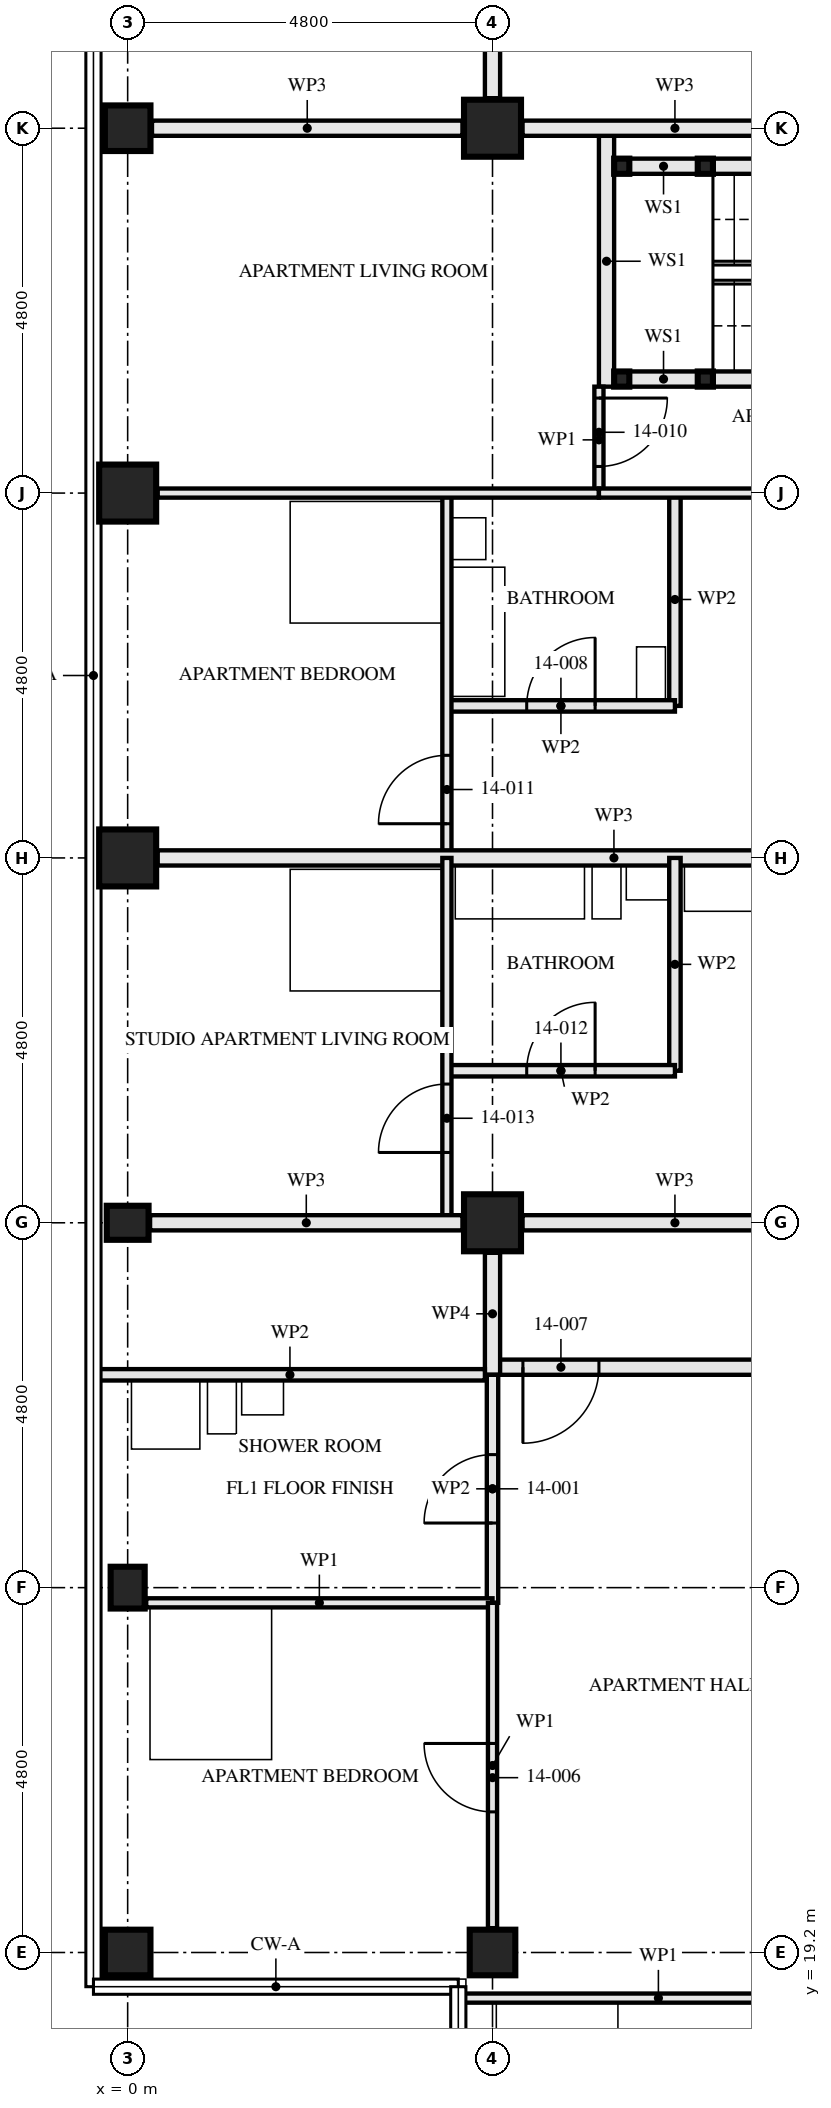
"""IFC4 building model, lengths in metres.
Left out: names, types, materials, properties, quantities, classifications, styles, units other than length and angle.
Written with IfcOpenShell. Run it as: python <this file> out.ifc"""

import sys

from ifc_helpers import new_model, si_unit, direction, frame, frame_2d, origin, origin_2d, place, context, subcontext, project, spatial, rectangle, hollow_rectangle, i_section, extrude, element, fill, save


model = new_model("IFC4")
c1 = context("Model", 3, precision=1e-05, world=origin(), true_north=direction((0.0, 1.0)))
c2 = subcontext(c1, "Body", "Model", "MODEL_VIEW")
j1 = project(units=[si_unit("LENGTHUNIT", "METRE"), si_unit("PLANEANGLEUNIT", "RADIAN")], contexts=[c1])
p1 = place(None, origin())
s1 = spatial("IfcSite", under=j1, at=p1, CompositionType="ELEMENT")
p2 = place(p1, origin())
s2 = spatial("IfcBuilding", under=s1, at=p2, CompositionType="ELEMENT")
p3 = place(p2, frame((0.0, 0.0, 55.0)))
s3 = spatial("IfcBuildingStorey", under=s2, at=p3, CompositionType="ELEMENT", Elevation=55.0)
p4 = place(p3, frame((0.0, 19.2, 0.0), z_axis=(0.0, 0.0, 1.0), x_axis=(0.0, 1.0, 0.0)))
e1 = element("IfcColumn", 1, at=p4, inside=s3, PredefinedType="COLUMN", context=c2, shape_type="SweptSolid", body=[
    extrude(hollow_rectangle(XDim=0.6, YDim=0.6, WallThickness=0.05, at=origin_2d()), origin(), (0.0, 0.0, 1.0), 3.5),
])
for number, where, z_axis, x_axis in (
    (2, (0.0, 24.0, 0.0), (0.0, 0.0, 1.0), (1.0, 0.0, 0.0)),
    (3, (0.0, 28.8, 0.0), (0.0, 0.0, 1.0), (0.0, 1.0, 0.0)),
):
    element("IfcColumn", number, at=place(p3, frame(where, z_axis=z_axis, x_axis=x_axis)), inside=s3, PredefinedType="COLUMN", context=c2, shape_type="SweptSolid", body=[
        extrude(i_section(OverallWidth=0.448, OverallDepth=0.55, WebThickness=0.072, FlangeThickness=0.115, FilletRadius=0.015, at=origin_2d()), origin(), (0.0, 0.0, 1.0), 3.5),
    ])
for number, where, z_axis, x_axis in (
    (4, (0.0, 33.6, 0.0), (0.0, 0.0, 1.0), (1.0, 0.0, 0.0)),
    (5, (0.0, 38.4, 0.0), (0.0, 0.0, 1.0), (1.0, 0.0, 0.0)),
):
    element("IfcColumn", number, at=place(p3, frame(where, z_axis=z_axis, x_axis=x_axis)), inside=s3, PredefinedType="COLUMN", context=c2, shape_type="SweptSolid", body=[
        extrude(hollow_rectangle(XDim=0.75, YDim=0.75, WallThickness=0.08, at=origin_2d()), origin(), (0.0, 0.0, 1.0), 3.5),
    ])
p5 = place(p3, frame((0.0, 43.2, 0.0), z_axis=(0.0, 0.0, 1.0), x_axis=(0.0, 1.0, 0.0)))
e6 = element("IfcColumn", 6, at=p5, inside=s3, PredefinedType="COLUMN", context=c2, shape_type="SweptSolid", body=[
    extrude(hollow_rectangle(XDim=0.6, YDim=0.6, WallThickness=0.08, at=origin_2d()), origin(), (0.0, 0.0, 1.0), 3.5),
])
p6 = place(p3, frame((4.8, 19.2, 0.0), z_axis=(0.0, 0.0, 1.0), x_axis=(0.0, 1.0, 0.0)))
e7 = element("IfcColumn", 7, at=p6, inside=s3, PredefinedType="COLUMN", context=c2, shape_type="SweptSolid", body=[
    extrude(hollow_rectangle(XDim=0.6, YDim=0.6, WallThickness=0.05, at=origin_2d()), origin(), (0.0, 0.0, 1.0), 3.5),
])
for number, where, z_axis, x_axis in (
    (8, (4.8, 28.8, 0.0), (0.0, 0.0, 1.0), (0.0, 1.0, 0.0)),
    (9, (4.8, 43.2, 0.0), (0.0, 0.0, 1.0), (0.0, 1.0, 0.0)),
):
    element("IfcColumn", number, at=place(p3, frame(where, z_axis=z_axis, x_axis=x_axis)), inside=s3, PredefinedType="COLUMN", context=c2, shape_type="SweptSolid", body=[
        extrude(hollow_rectangle(XDim=0.75, YDim=0.75, WallThickness=0.08, at=origin_2d()), origin(), (0.0, 0.0, 1.0), 3.5),
    ])
for number, where, z_axis, x_axis in (
    (10, (6.5, 42.7, 0.0), (0.0, 0.0, 1.0), (1.0, 0.0, 0.0)),
    (11, (6.5, 39.9, 0.0), (0.0, 0.0, 1.0), (1.0, 0.0, 0.0)),
    (12, (7.6, 42.7, 0.0), (0.0, 0.0, 1.0), (1.0, 0.0, 0.0)),
    (13, (7.6, 39.9, 0.0), (0.0, 0.0, 1.0), (1.0, 0.0, 0.0)),
):
    element("IfcColumn", number, at=place(p3, frame(where, z_axis=z_axis, x_axis=x_axis)), inside=s3, PredefinedType="COLUMN", context=c2, shape_type="SweptSolid", body=[
        extrude(hollow_rectangle(XDim=0.2, YDim=0.2, WallThickness=0.008, at=origin_2d()), origin(), (0.0, 0.0, 1.0), 3.33),
    ])
p7 = place(p3, frame((4.8, 23.8, 0.0), z_axis=(0.0, 0.0, 1.0), x_axis=(0.0, 1.0, 0.0)))
e14 = element("IfcWall", 14, at=p7, inside=s3, PredefinedType="PARTITIONING", context=c2, shape_type="SweptSolid", body=[
    extrude(rectangle(XDim=3.0, YDim=0.15, at=frame_2d((1.5, 0.0))), origin(), (0.0, 0.0, 1.0), 2.55),
])
p8 = place(p7, frame((1.05, 0.0, 0.0)))
e15 = element("IfcOpeningElement", 15, at=p8, cuts=e14, PredefinedType="OPENING", context=c2, shape_type="SweptSolid", body=[
    extrude(rectangle(XDim=0.9, YDim=2.1, at=frame_2d((0.45, 1.05))), frame((0.0, 0.085, 0.0), z_axis=(0.0, -1.0, 0.0), x_axis=(1.0, 0.0, 0.0)), (0.0, 0.0, 1.0), 0.171),
])
p9 = place(p3, frame((0.244, 23.8, 0.0), z_axis=(0.0, 0.0, 1.0), x_axis=(1.0, 0.0, 0.0)))
e16 = element("IfcWall", 16, at=p9, inside=s3, PredefinedType="PARTITIONING", context=c2, shape_type="SweptSolid", body=[
    extrude(rectangle(XDim=4.556, YDim=0.12, at=frame_2d((2.278, 0.0))), origin(), (0.0, 0.0, 1.0), 3.33),
])
p10 = place(p3, frame((4.365, 18.6, 0.0), z_axis=(0.0, 0.0, 1.0), x_axis=(1.0, 0.0, 0.0)))
e17 = element("IfcWall", 17, at=p10, inside=s3, PredefinedType="PARTITIONING", context=c2, shape_type="SweptSolid", body=[
    extrude(rectangle(XDim=5.235, YDim=0.12, at=frame_2d((2.618, 0.0))), origin(), (0.0, 0.0, 1.0), 2.32),
])
p11 = place(p10, frame((3.885, 0.0, 0.0)))
e18 = element("IfcOpeningElement", 18, at=p11, cuts=e17, PredefinedType="OPENING", context=c2, shape_type="SweptSolid", body=[
    extrude(rectangle(XDim=0.9, YDim=2.1, at=frame_2d((0.45, 1.05))), frame((0.0, 0.071, 0.0), z_axis=(0.0, -1.0, 0.0), x_axis=(1.0, 0.0, 0.0)), (0.0, 0.0, 1.0), 0.141),
])
p12 = place(p3, frame((4.8, 19.52, 0.0), z_axis=(0.0, 0.0, 1.0), x_axis=(0.0, 1.0, 0.0)))
e19 = element("IfcWall", 19, at=p12, inside=s3, PredefinedType="PARTITIONING", context=c2, shape_type="SweptSolid", body=[
    extrude(rectangle(XDim=4.28, YDim=0.12, at=frame_2d((2.14, 0.0))), origin(), (0.0, 0.0, 1.0), 3.33),
])
p13 = place(p12, frame((1.53, 0.0, 0.0)))
e20 = element("IfcOpeningElement", 20, at=p13, cuts=e19, PredefinedType="OPENING", context=c2, shape_type="SweptSolid", body=[
    extrude(rectangle(XDim=0.9, YDim=2.1, at=frame_2d((0.45, 1.05))), frame((0.0, 0.071, 0.0), z_axis=(0.0, -1.0, 0.0), x_axis=(1.0, 0.0, 0.0)), (0.0, 0.0, 1.0), 0.141),
])
p14 = place(p3, frame((4.8, 26.9, 0.0), z_axis=(0.0, 0.0, 1.0), x_axis=(1.0, 0.0, 0.0)))
e21 = element("IfcWall", 21, at=p14, inside=s3, PredefinedType="PARTITIONING", context=c2, shape_type="SweptSolid", body=[
    extrude(rectangle(XDim=9.6, YDim=0.2, at=frame_2d((4.8, 0.0))), origin(), (0.0, 0.0, 1.0), 3.33),
])
p15 = place(p14, frame((0.4, 0.0, 0.0)))
e22 = element("IfcOpeningElement", 22, at=p15, cuts=e21, PredefinedType="OPENING", context=c2, shape_type="SweptSolid", body=[
    extrude(rectangle(XDim=1.0, YDim=2.1, at=frame_2d((0.5, 1.05))), frame((0.0, 0.111, 0.0), z_axis=(0.0, -1.0, 0.0), x_axis=(1.0, 0.0, 0.0)), (0.0, 0.0, 1.0), 0.221),
])
p16 = place(p3, frame((4.8, 26.8, 0.0), z_axis=(0.0, 0.0, 1.0), x_axis=(0.0, 1.0, 0.0)))
e23 = element("IfcWall", 23, at=p16, inside=s3, PredefinedType="PARTITIONING", context=c2, shape_type="SweptSolid", body=[
    extrude(rectangle(XDim=1.605, YDim=0.2, at=frame_2d((0.802, 0.0))), origin(), (0.0, 0.0, 1.0), 3.33),
])
p17 = place(p3, frame((6.6, 42.7, 0.0), z_axis=(0.0, 0.0, 1.0), x_axis=(1.0, 0.0, 0.0)))
e24 = element("IfcWall", 24, at=p17, inside=s3, PredefinedType="SOLIDWALL", context=c2, shape_type="SweptSolid", body=[
    extrude(rectangle(XDim=0.9, YDim=0.2, at=frame_2d((0.45, 0.0))), origin(), (0.0, 0.0, 1.0), 2.99),
])
p18 = place(p3, frame((7.7, 42.7, 0.0), z_axis=(0.0, 0.0, 1.0), x_axis=(1.0, 0.0, 0.0)))
e25 = element("IfcWall", 25, at=p18, inside=s3, PredefinedType="SOLIDWALL", context=c2, shape_type="SweptSolid", body=[
    extrude(rectangle(XDim=4.7, YDim=0.2, at=frame_2d((2.35, 0.0))), origin(), (0.0, 0.0, 1.0), 2.99),
])
p19 = place(p3, frame((6.6, 39.9, 0.0), z_axis=(0.0, 0.0, 1.0), x_axis=(1.0, 0.0, 0.0)))
e26 = element("IfcWall", 26, at=p19, inside=s3, PredefinedType="SOLIDWALL", context=c2, shape_type="SweptSolid", body=[
    extrude(rectangle(XDim=0.9, YDim=0.2, at=frame_2d((0.45, 0.0))), origin(), (0.0, 0.0, 1.0), 2.99),
])
p20 = place(p3, frame((7.7, 39.9, 0.0), z_axis=(0.0, 0.0, 1.0), x_axis=(1.0, 0.0, 0.0)))
e27 = element("IfcWall", 27, at=p20, inside=s3, PredefinedType="SOLIDWALL", context=c2, shape_type="SweptSolid", body=[
    extrude(rectangle(XDim=4.7, YDim=0.2, at=frame_2d((2.35, 0.0))), origin(), (0.0, 0.0, 1.0), 2.99),
])
p21 = place(p3, frame((6.3, 43.1, 0.0), z_axis=(0.0, 0.0, 1.0), x_axis=(0.0, -1.0, 0.0)))
e28 = element("IfcWall", 28, at=p21, inside=s3, PredefinedType="SOLIDWALL", context=c2, shape_type="SweptSolid", body=[
    extrude(rectangle(XDim=3.3, YDim=0.2, at=frame_2d((1.65, 0.0))), origin(), (0.0, 0.0, 1.0), 3.33),
])
p22 = place(p3, frame((4.2, 35.6, 0.0), z_axis=(0.0, 0.0, 1.0), x_axis=(1.0, 0.0, 0.0)))
e29 = element("IfcWall", 29, at=p22, inside=s3, PredefinedType="PARTITIONING", context=c2, shape_type="SweptSolid", body=[
    extrude(rectangle(XDim=3.0, YDim=0.15, at=frame_2d((1.5, 0.0))), origin(), (0.0, 0.0, 1.0), 3.33),
])
p23 = place(p22, frame((1.05, 0.0, 0.0)))
e30 = element("IfcOpeningElement", 30, at=p23, cuts=e29, PredefinedType="OPENING", context=c2, shape_type="SweptSolid", body=[
    extrude(rectangle(XDim=0.9, YDim=2.1, at=frame_2d((0.45, 1.05))), frame((0.0, 0.085, 0.0), z_axis=(0.0, -1.0, 0.0), x_axis=(1.0, 0.0, 0.0)), (0.0, 0.0, 1.0), 0.171),
])
p24 = place(p3, frame((7.2, 38.4, 0.0), z_axis=(0.0, 0.0, 1.0), x_axis=(0.0, -1.0, 0.0)))
e31 = element("IfcWall", 31, at=p24, inside=s3, PredefinedType="PARTITIONING", context=c2, shape_type="SweptSolid", body=[
    extrude(rectangle(XDim=2.8, YDim=0.15, at=frame_2d((1.4, 0.0))), origin(), (0.0, 0.0, 1.0), 3.33),
])
p25 = place(p3, frame((6.2, 38.4, 0.0), z_axis=(0.0, 0.0, 1.0), x_axis=(1.0, 0.0, 0.0)))
e32 = element("IfcWall", 32, at=p25, inside=s3, PredefinedType="PARTITIONING", context=c2, shape_type="SweptSolid", body=[
    extrude(rectangle(XDim=6.25, YDim=0.12, at=frame_2d((3.125, 0.0))), origin(), (0.0, 0.0, 1.0), 2.55),
])
p26 = place(p25, frame((3.15, 0.0, 0.0)))
e33 = element("IfcOpeningElement", 33, at=p26, cuts=e32, PredefinedType="OPENING", context=c2, shape_type="SweptSolid", body=[
    extrude(rectangle(XDim=0.9, YDim=2.1, at=frame_2d((0.45, 1.05))), frame((0.0, 0.071, 0.0), z_axis=(0.0, -1.0, 0.0), x_axis=(1.0, 0.0, 0.0)), (0.0, 0.0, 1.0), 0.141),
])
p27 = place(p3, frame((6.2, 39.8, 0.0), z_axis=(0.0, 0.0, 1.0), x_axis=(0.0, -1.0, 0.0)))
e34 = element("IfcWall", 34, at=p27, inside=s3, PredefinedType="PARTITIONING", context=c2, shape_type="SweptSolid", body=[
    extrude(rectangle(XDim=1.4, YDim=0.12, at=frame_2d((0.7, 0.0))), origin(), (0.0, 0.0, 1.0), 3.33),
])
p28 = place(p27, frame((0.15, 0.0, 0.0)))
e35 = element("IfcOpeningElement", 35, at=p28, cuts=e34, PredefinedType="OPENING", context=c2, shape_type="SweptSolid", body=[
    extrude(rectangle(XDim=0.9, YDim=2.1, at=frame_2d((0.45, 1.05))), frame((0.0, 0.071, 0.0), z_axis=(0.0, -1.0, 0.0), x_axis=(1.0, 0.0, 0.0)), (0.0, 0.0, 1.0), 0.141),
])
p29 = place(p3, frame((4.2, 38.4, 0.0), z_axis=(0.0, 0.0, 1.0), x_axis=(0.0, -1.0, 0.0)))
e36 = element("IfcWall", 36, at=p29, inside=s3, PredefinedType="PARTITIONING", context=c2, shape_type="SweptSolid", body=[
    extrude(rectangle(XDim=4.8, YDim=0.12, at=frame_2d((2.4, 0.0))), origin(), (0.0, 0.0, 1.0), 3.33),
])
p30 = place(p29, frame((3.45, 0.0, 0.0)))
e37 = element("IfcOpeningElement", 37, at=p30, cuts=e36, PredefinedType="OPENING", context=c2, shape_type="SweptSolid", body=[
    extrude(rectangle(XDim=0.9, YDim=2.1, at=frame_2d((0.45, 1.05))), frame((0.0, 0.071, 0.0), z_axis=(0.0, -1.0, 0.0), x_axis=(1.0, 0.0, 0.0)), (0.0, 0.0, 1.0), 0.141),
])
p31 = place(p3, frame((0.395, 38.4, 0.0), z_axis=(0.0, 0.0, 1.0), x_axis=(1.0, 0.0, 0.0)))
e38 = element("IfcWall", 38, at=p31, inside=s3, PredefinedType="PARTITIONING", context=c2, shape_type="SweptSolid", body=[
    extrude(rectangle(XDim=5.805, YDim=0.12, at=frame_2d((2.902, 0.0))), origin(), (0.0, 0.0, 1.0), 2.55),
])
p32 = place(p3, frame((0.395, 33.6, 0.0), z_axis=(0.0, 0.0, 1.0), x_axis=(1.0, 0.0, 0.0)))
e39 = element("IfcWall", 39, at=p32, inside=s3, PredefinedType="PARTITIONING", context=c2, shape_type="SweptSolid", body=[
    extrude(rectangle(XDim=12.005, YDim=0.2, at=frame_2d((6.002, 0.0))), origin(), (0.0, 0.0, 1.0), 2.55),
])
p33 = place(p3, frame((4.2, 30.8, 0.0), z_axis=(0.0, 0.0, 1.0), x_axis=(1.0, 0.0, 0.0)))
e40 = element("IfcWall", 40, at=p33, inside=s3, PredefinedType="PARTITIONING", context=c2, shape_type="SweptSolid", body=[
    extrude(rectangle(XDim=3.0, YDim=0.15, at=frame_2d((1.5, 0.0))), origin(), (0.0, 0.0, 1.0), 3.33),
])
p34 = place(p33, frame((1.05, 0.0, 0.0)))
e41 = element("IfcOpeningElement", 41, at=p34, cuts=e40, PredefinedType="OPENING", context=c2, shape_type="SweptSolid", body=[
    extrude(rectangle(XDim=0.9, YDim=2.1, at=frame_2d((0.45, 1.05))), frame((0.0, 0.085, 0.0), z_axis=(0.0, -1.0, 0.0), x_axis=(1.0, 0.0, 0.0)), (0.0, 0.0, 1.0), 0.171),
])
p35 = place(p3, frame((7.2, 33.6, 0.0), z_axis=(0.0, 0.0, 1.0), x_axis=(0.0, -1.0, 0.0)))
e42 = element("IfcWall", 42, at=p35, inside=s3, PredefinedType="PARTITIONING", context=c2, shape_type="SweptSolid", body=[
    extrude(rectangle(XDim=2.8, YDim=0.15, at=frame_2d((1.4, 0.0))), origin(), (0.0, 0.0, 1.0), 3.33),
])
p36 = place(p3, frame((4.2, 33.6, 0.0), z_axis=(0.0, 0.0, 1.0), x_axis=(0.0, -1.0, 0.0)))
e43 = element("IfcWall", 43, at=p36, inside=s3, PredefinedType="PARTITIONING", context=c2, shape_type="SweptSolid", body=[
    extrude(rectangle(XDim=4.8, YDim=0.12, at=frame_2d((2.4, 0.0))), origin(), (0.0, 0.0, 1.0), 3.33),
])
p37 = place(p36, frame((2.975, 0.0, 0.0)))
e44 = element("IfcOpeningElement", 44, at=p37, cuts=e43, PredefinedType="OPENING", context=c2, shape_type="SweptSolid", body=[
    extrude(rectangle(XDim=0.9, YDim=2.1, at=frame_2d((0.45, 1.05))), frame((0.0, 0.071, 0.0), z_axis=(0.0, -1.0, 0.0), x_axis=(1.0, 0.0, 0.0)), (0.0, 0.0, 1.0), 0.141),
])
p38 = place(p3, frame((4.8, 45.2, 0.0), z_axis=(0.0, 0.0, 1.0), x_axis=(0.0, -1.0, 0.0)))
e45 = element("IfcWall", 45, at=p38, inside=s3, PredefinedType="PARTITIONING", context=c2, shape_type="SweptSolid", body=[
    extrude(rectangle(XDim=1.605, YDim=0.2, at=frame_2d((0.802, 0.0))), origin(), (0.0, 0.0, 1.0), 3.33),
])
p39 = place(p3, frame((9.205, 28.8, 0.0), z_axis=(0.0, 0.0, 1.0), x_axis=(-1.0, 0.0, 0.0)))
e46 = element("IfcWall", 46, at=p39, inside=s3, PredefinedType="PARTITIONING", context=c2, shape_type="SweptSolid", body=[
    extrude(rectangle(XDim=4.01, YDim=0.2, at=frame_2d((2.005, 0.0))), origin(), (0.0, 0.0, 1.0), 2.32),
])
p40 = place(p3, frame((4.405, 28.8, 0.0), z_axis=(0.0, 0.0, 1.0), x_axis=(-1.0, 0.0, 0.0)))
e47 = element("IfcWall", 47, at=p40, inside=s3, PredefinedType="PARTITIONING", context=c2, shape_type="SweptSolid", body=[
    extrude(rectangle(XDim=4.11, YDim=0.2, at=frame_2d((2.055, 0.0))), origin(), (0.0, 0.0, 1.0), 2.32),
])
p41 = place(p3, frame((9.205, 43.2, 0.0), z_axis=(0.0, 0.0, 1.0), x_axis=(-1.0, 0.0, 0.0)))
e48 = element("IfcWall", 48, at=p41, inside=s3, PredefinedType="PARTITIONING", context=c2, shape_type="SweptSolid", body=[
    extrude(rectangle(XDim=4.01, YDim=0.2, at=frame_2d((2.005, 0.0))), origin(), (0.0, 0.0, 1.0), 2.32),
])
p42 = place(p3, frame((4.405, 43.2, 0.0), z_axis=(0.0, 0.0, 1.0), x_axis=(-1.0, 0.0, 0.0)))
e49 = element("IfcWall", 49, at=p42, inside=s3, PredefinedType="PARTITIONING", context=c2, shape_type="SweptSolid", body=[
    extrude(rectangle(XDim=4.085, YDim=0.2, at=frame_2d((2.042, 0.0))), origin(), (0.0, 0.0, 1.0), 2.32),
])
p43 = place(p3, frame((-0.43, 26.8, 0.0), z_axis=(0.0, 0.0, 1.0), x_axis=(1.0, 0.0, 0.0)))
e50 = element("IfcWall", 50, at=p43, inside=s3, PredefinedType="PARTITIONING", context=c2, shape_type="SweptSolid", body=[
    extrude(rectangle(XDim=5.13, YDim=0.15, at=frame_2d((2.565, 0.0))), origin(), (0.0, 0.0, 1.0), 2.32),
])
p44 = place(p8, origin())
e51 = element("IfcDoor", 51, at=p44, inside=s3, OperationType="SINGLE_SWING_RIGHT", PredefinedType="DOOR", context=c2, shape_type="SweptSolid", body=[
    extrude(rectangle(XDim=0.9, YDim=2.1, at=frame_2d((0.45, 1.05))), frame((0.0, 0.022, 0.0), z_axis=(0.0, -1.0, 0.0), x_axis=(1.0, 0.0, 0.0)), (0.0, 0.0, 1.0), 0.044),
])
fill(e15, e51)
p45 = place(p13, origin())
e52 = element("IfcDoor", 52, at=p45, inside=s3, OperationType="SINGLE_SWING_LEFT", PredefinedType="DOOR", context=c2, shape_type="SweptSolid", body=[
    extrude(rectangle(XDim=0.9, YDim=2.1, at=frame_2d((0.45, 1.05))), frame((0.0, 0.022, 0.0), z_axis=(0.0, -1.0, 0.0), x_axis=(1.0, 0.0, 0.0)), (0.0, 0.0, 1.0), 0.044),
])
fill(e20, e52)
p46 = place(p15, frame((1.0, 0.0, 0.0), z_axis=(0.0, 0.0, 1.0), x_axis=(-1.0, 0.0, 0.0)))
e53 = element("IfcDoor", 53, at=p46, inside=s3, OperationType="SINGLE_SWING_LEFT", PredefinedType="DOOR", context=c2, shape_type="SweptSolid", body=[
    extrude(rectangle(XDim=1.0, YDim=2.1, at=frame_2d((0.5, 1.05))), frame((0.0, 0.027, 0.0), z_axis=(0.0, -1.0, 0.0), x_axis=(1.0, 0.0, 0.0)), (0.0, 0.0, 1.0), 0.054),
])
fill(e22, e53)
p47 = place(p23, origin())
e54 = element("IfcDoor", 54, at=p47, inside=s3, OperationType="SINGLE_SWING_LEFT", PredefinedType="DOOR", context=c2, shape_type="SweptSolid", body=[
    extrude(rectangle(XDim=0.9, YDim=2.1, at=frame_2d((0.45, 1.05))), frame((0.0, 0.022, 0.0), z_axis=(0.0, -1.0, 0.0), x_axis=(1.0, 0.0, 0.0)), (0.0, 0.0, 1.0), 0.044),
])
fill(e30, e54)
p48 = place(p28, origin())
e55 = element("IfcDoor", 55, at=p48, inside=s3, OperationType="SINGLE_SWING_RIGHT", PredefinedType="DOOR", context=c2, shape_type="SweptSolid", body=[
    extrude(rectangle(XDim=0.9, YDim=2.1, at=frame_2d((0.45, 1.05))), frame((0.0, 0.022, 0.0), z_axis=(0.0, -1.0, 0.0), x_axis=(1.0, 0.0, 0.0)), (0.0, 0.0, 1.0), 0.044),
])
fill(e35, e55)
p49 = place(p30, frame((0.9, 0.0, 0.0), z_axis=(0.0, 0.0, 1.0), x_axis=(-1.0, 0.0, 0.0)))
e56 = element("IfcDoor", 56, at=p49, inside=s3, OperationType="SINGLE_SWING_RIGHT", PredefinedType="DOOR", context=c2, shape_type="SweptSolid", body=[
    extrude(rectangle(XDim=0.9, YDim=2.1, at=frame_2d((0.45, 1.05))), frame((0.0, 0.022, 0.0), z_axis=(0.0, -1.0, 0.0), x_axis=(1.0, 0.0, 0.0)), (0.0, 0.0, 1.0), 0.044),
])
fill(e37, e56)
p50 = place(p34, origin())
e57 = element("IfcDoor", 57, at=p50, inside=s3, OperationType="SINGLE_SWING_LEFT", PredefinedType="DOOR", context=c2, shape_type="SweptSolid", body=[
    extrude(rectangle(XDim=0.9, YDim=2.1, at=frame_2d((0.45, 1.05))), frame((0.0, 0.022, 0.0), z_axis=(0.0, -1.0, 0.0), x_axis=(1.0, 0.0, 0.0)), (0.0, 0.0, 1.0), 0.044),
])
fill(e41, e57)
p51 = place(p37, frame((0.9, 0.0, 0.0), z_axis=(0.0, 0.0, 1.0), x_axis=(-1.0, 0.0, 0.0)))
e58 = element("IfcDoor", 58, at=p51, inside=s3, OperationType="SINGLE_SWING_RIGHT", PredefinedType="DOOR", context=c2, shape_type="SweptSolid", body=[
    extrude(rectangle(XDim=0.9, YDim=2.1, at=frame_2d((0.45, 1.05))), frame((0.0, 0.022, 0.0), z_axis=(0.0, -1.0, 0.0), x_axis=(1.0, 0.0, 0.0)), (0.0, 0.0, 1.0), 0.044),
])
fill(e44, e58)
save(model, sys.argv[1])
